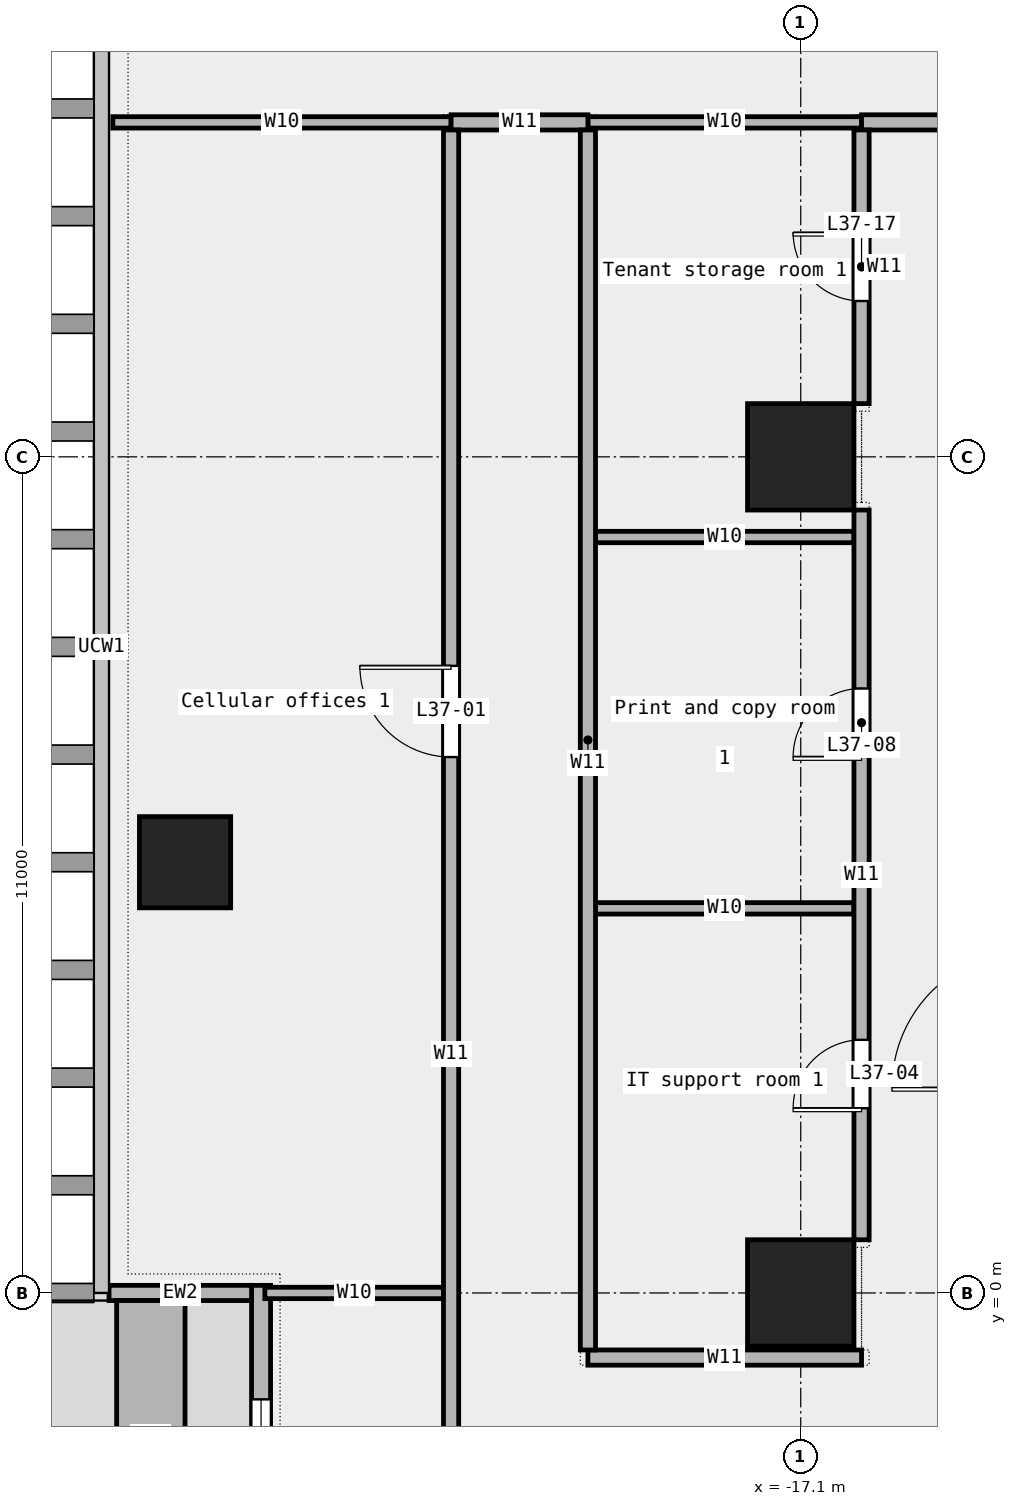
"""IFC4 building model, lengths in metres.
Left out: names, types, materials, properties, quantities, classifications, styles, units other than length and angle.
Written with IfcOpenShell. Run it as: python <this file> out.ifc"""

import sys

from ifc_helpers import new_model, si_unit, direction, frame, frame_2d, origin, origin_2d, place, context, subcontext, project, spatial, rectangle, extrude, element, fill, save


model = new_model("IFC4")
c1 = context("Model", 3, precision=1e-05, world=origin(), true_north=direction((0.0, 1.0)))
c2 = subcontext(c1, "Body", "Model", "MODEL_VIEW")
j1 = project(units=[si_unit("LENGTHUNIT", "METRE"), si_unit("PLANEANGLEUNIT", "RADIAN")], contexts=[c1])
p1 = place(None, origin())
s1 = spatial("IfcSite", under=j1, at=p1, CompositionType="ELEMENT")
p2 = place(p1, origin())
s2 = spatial("IfcBuilding", under=s1, at=p2, CompositionType="ELEMENT")
p3 = place(p2, frame((0.0, 0.0, 181.0)))
s3 = spatial("IfcBuildingStorey", under=s2, at=p3, CompositionType="ELEMENT", Elevation=181.0)
p4 = place(p3, frame((-25.2, 5.667, 0.0), z_axis=(0.0, 0.0, 1.0), x_axis=(1.0, 0.0, 0.0)))
e1 = element("IfcColumn", 1, at=p4, inside=s3, PredefinedType="COLUMN", context=c2, shape_type="SweptSolid", body=[
    extrude(rectangle(XDim=1.2, YDim=1.2, at=origin_2d()), origin(), (0.0, 0.0, 1.0), 3.6),
])
for number, where, z_axis, x_axis in (
    (2, (-17.1, 0.0, 0.0), (0.0, 0.0, 1.0), (1.0, 0.0, 0.0)),
    (3, (-17.1, 11.0, 0.0), (0.0, 0.0, 1.0), (1.0, 0.0, 0.0)),
):
    element("IfcColumn", number, at=place(p3, frame(where, z_axis=z_axis, x_axis=x_axis)), inside=s3, PredefinedType="COLUMN", context=c2, shape_type="SweptSolid", body=[
        extrude(rectangle(XDim=1.4, YDim=1.4, at=origin_2d()), origin(), (0.0, 0.0, 1.0), 3.6),
    ])
p5 = place(p3, frame((-24.2, 0.1, 0.0), z_axis=(0.0, 0.0, 1.0), x_axis=(0.0, -1.0, 0.0)))
e4 = element("IfcWall", 4, at=p5, inside=s3, PredefinedType="STANDARD", context=c2, shape_type="SweptSolid", body=[
    extrude(rectangle(XDim=12.95, YDim=0.25, at=frame_2d((6.475, 0.0))), origin(), (0.0, 0.0, 1.0), 3.6),
])
p6 = place(p5, frame((1.5, 0.0, 0.45)))
e5 = element("IfcOpeningElement", 5, at=p6, cuts=e4, PredefinedType="OPENING", context=c2, shape_type="SweptSolid", body=[
    extrude(rectangle(XDim=1.5, YDim=2.4, at=frame_2d((0.75, 1.2))), frame((0.0, 0.137, 0.0), z_axis=(0.0, -1.0, 0.0), x_axis=(1.0, 0.0, 0.0)), (0.0, 0.0, 1.0), 0.274),
])
p7 = place(p5, frame((6.75, 0.0, 0.0)))
e6 = element("IfcOpeningElement", 6, at=p7, cuts=e4, PredefinedType="OPENING", context=c2, shape_type="SweptSolid", body=[
    extrude(rectangle(XDim=1.8, YDim=2.4, at=frame_2d((0.9, 1.2))), frame((0.0, 0.137, 0.0), z_axis=(0.0, -1.0, 0.0), x_axis=(1.0, 0.0, 0.0)), (0.0, 0.0, 1.0), 0.274),
])
p8 = place(p5, frame((10.0, 0.0, 0.45)))
e7 = element("IfcOpeningElement", 7, at=p8, cuts=e4, PredefinedType="OPENING", context=c2, shape_type="SweptSolid", body=[
    extrude(rectangle(XDim=1.5, YDim=2.4, at=frame_2d((0.75, 1.2))), frame((0.0, 0.137, 0.0), z_axis=(0.0, -1.0, 0.0), x_axis=(1.0, 0.0, 0.0)), (0.0, 0.0, 1.0), 0.274),
])
p9 = place(p3, frame((-26.2, 0.0, 0.0), z_axis=(0.0, 0.0, 1.0), x_axis=(1.0, 0.0, 0.0)))
e8 = element("IfcWall", 8, at=p9, inside=s3, PredefinedType="STANDARD", context=c2, shape_type="SweptSolid", body=[
    extrude(rectangle(XDim=1.875, YDim=0.2, at=frame_2d((0.938, 0.0))), origin(), (0.0, 0.0, 1.0), 3.6),
])
p10 = place(p3, frame((-25.65, -0.1, 0.0), z_axis=(0.0, 0.0, 1.0), x_axis=(0.0, -1.0, 0.0)))
e9 = element("IfcWall", 9, at=p10, inside=s3, PredefinedType="STANDARD", context=c2, shape_type="SweptSolid", body=[
    extrude(rectangle(XDim=3.6, YDim=0.9, at=frame_2d((1.8, 0.0))), origin(), (0.0, 0.0, 1.0), 0.7),
])
p11 = place(p3, frame((-19.9, -0.85, 0.0), z_axis=(0.0, 0.0, 1.0), x_axis=(1.0, 0.0, 0.0)))
e10 = element("IfcWall", 10, at=p11, inside=s3, PredefinedType="PARTITIONING", context=c2, shape_type="SweptSolid", body=[
    extrude(rectangle(XDim=3.6, YDim=0.2, at=frame_2d((1.8, 0.0))), origin(), (0.0, 0.0, 1.0), 3.6),
])
p12 = place(p3, frame((-24.15, 0.0, 0.0), z_axis=(0.0, 0.0, 1.0), x_axis=(1.0, 0.0, 0.0)))
e11 = element("IfcWall", 11, at=p12, inside=s3, PredefinedType="PARTITIONING", context=c2, shape_type="SweptSolid", body=[
    extrude(rectangle(XDim=2.35, YDim=0.15, at=frame_2d((1.175, 0.0))), origin(), (0.0, 0.0, 1.0), 3.6),
])
for number, where, z_axis, x_axis in (
    (12, (-19.8, 5.06, 0.0), (0.0, 0.0, 1.0), (1.0, 0.0, 0.0)),
    (13, (-19.8, 9.945, 0.0), (0.0, 0.0, 1.0), (1.0, 0.0, 0.0)),
):
    element("IfcWall", number, at=place(p3, frame(where, z_axis=z_axis, x_axis=x_axis)), inside=s3, PredefinedType="PARTITIONING", context=c2, shape_type="SweptSolid", body=[
        extrude(rectangle(XDim=3.4, YDim=0.15, at=frame_2d((1.7, 0.0))), origin(), (0.0, 0.0, 1.0), 3.6),
    ])
p13 = place(p3, frame((-26.15, 15.4, 0.0), z_axis=(0.0, 0.0, 1.0), x_axis=(1.0, 0.0, 0.0)))
e14 = element("IfcWall", 14, at=p13, inside=s3, PredefinedType="PARTITIONING", context=c2, shape_type="SweptSolid", body=[
    extrude(rectangle(XDim=4.45, YDim=0.15, at=frame_2d((2.225, 0.0))), origin(), (0.0, 0.0, 1.0), 3.6),
])
p14 = place(p3, frame((-19.9, 15.4, 0.0), z_axis=(0.0, 0.0, 1.0), x_axis=(1.0, 0.0, 0.0)))
e15 = element("IfcWall", 15, at=p14, inside=s3, PredefinedType="PARTITIONING", context=c2, shape_type="SweptSolid", body=[
    extrude(rectangle(XDim=3.6, YDim=0.15, at=frame_2d((1.8, 0.0))), origin(), (0.0, 0.0, 1.0), 3.6),
])
p15 = place(p3, frame((-21.7, 15.4, 0.0), z_axis=(0.0, 0.0, 1.0), x_axis=(1.0, 0.0, 0.0)))
e16 = element("IfcWall", 16, at=p15, inside=s3, PredefinedType="PARTITIONING", context=c2, shape_type="SweptSolid", body=[
    extrude(rectangle(XDim=1.8, YDim=0.2, at=frame_2d((0.9, 0.0))), origin(), (0.0, 0.0, 1.0), 3.6),
])
p16 = place(p3, frame((-16.3, 15.4, 0.0), z_axis=(0.0, 0.0, 1.0), x_axis=(1.0, 0.0, 0.0)))
e17 = element("IfcWall", 17, at=p16, inside=s3, PredefinedType="PARTITIONING", context=c2, shape_type="SweptSolid", body=[
    extrude(rectangle(XDim=32.6, YDim=0.2, at=frame_2d((16.3, 0.0))), origin(), (0.0, 0.0, 1.0), 3.6),
])
p17 = place(p16, frame((24.677, 0.0, 0.0)))
e18 = element("IfcOpeningElement", 18, at=p17, cuts=e17, PredefinedType="OPENING", context=c2, shape_type="SweptSolid", body=[
    extrude(rectangle(XDim=1.2, YDim=2.1, at=frame_2d((0.6, 1.05))), frame((0.0, 0.112, 0.0), z_axis=(0.0, -1.0, 0.0), x_axis=(1.0, 0.0, 0.0)), (0.0, 0.0, 1.0), 0.224),
])
p18 = place(p16, frame((4.805, 0.0, 0.0)))
e19 = element("IfcOpeningElement", 19, at=p18, cuts=e17, PredefinedType="OPENING", context=c2, shape_type="SweptSolid", body=[
    extrude(rectangle(XDim=1.5, YDim=2.1, at=frame_2d((0.75, 1.05))), frame((0.0, 0.112, 0.0), z_axis=(0.0, -1.0, 0.0), x_axis=(1.0, 0.0, 0.0)), (0.0, 0.0, 1.0), 0.224),
])
p19 = place(p16, frame((14.228, 0.0, 0.0)))
e20 = element("IfcOpeningElement", 20, at=p19, cuts=e17, PredefinedType="OPENING", context=c2, shape_type="SweptSolid", body=[
    extrude(rectangle(XDim=1.2, YDim=2.1, at=frame_2d((0.6, 1.05))), frame((0.0, 0.112, 0.0), z_axis=(0.0, -1.0, 0.0), x_axis=(1.0, 0.0, 0.0)), (0.0, 0.0, 1.0), 0.224),
])
p20 = place(p3, frame((-21.7, -9.0, 0.0), z_axis=(0.0, 0.0, 1.0), x_axis=(0.0, 1.0, 0.0)))
e21 = element("IfcWall", 21, at=p20, inside=s3, PredefinedType="PARTITIONING", context=c2, shape_type="SweptSolid", body=[
    extrude(rectangle(XDim=24.3, YDim=0.2, at=frame_2d((12.15, 0.0))), origin(), (0.0, 0.0, 1.0), 3.6),
])
p21 = place(p20, frame((16.05, 0.0, 0.0)))
e22 = element("IfcOpeningElement", 22, at=p21, cuts=e21, PredefinedType="OPENING", context=c2, shape_type="SweptSolid", body=[
    extrude(rectangle(XDim=1.2, YDim=2.1, at=frame_2d((0.6, 1.05))), frame((0.0, 0.112, 0.0), z_axis=(0.0, -1.0, 0.0), x_axis=(1.0, 0.0, 0.0)), (0.0, 0.0, 1.0), 0.224),
])
p22 = place(p3, frame((-19.9, -0.75, 0.0), z_axis=(0.0, 0.0, 1.0), x_axis=(0.0, 1.0, 0.0)))
e23 = element("IfcWall", 23, at=p22, inside=s3, PredefinedType="PARTITIONING", context=c2, shape_type="SweptSolid", body=[
    extrude(rectangle(XDim=16.05, YDim=0.2, at=frame_2d((8.025, 0.0))), origin(), (0.0, 0.0, 1.0), 3.6),
])
p23 = place(p3, frame((-16.3, 0.7, 0.0), z_axis=(0.0, 0.0, 1.0), x_axis=(0.0, 1.0, 0.0)))
e24 = element("IfcWall", 24, at=p23, inside=s3, PredefinedType="PARTITIONING", context=c2, shape_type="SweptSolid", body=[
    extrude(rectangle(XDim=9.6, YDim=0.2, at=frame_2d((4.8, 0.0))), origin(), (0.0, 0.0, 1.0), 3.6),
])
p24 = place(p23, frame((1.73, 0.0, 0.0)))
e25 = element("IfcOpeningElement", 25, at=p24, cuts=e24, PredefinedType="OPENING", context=c2, shape_type="SweptSolid", body=[
    extrude(rectangle(XDim=0.9, YDim=2.1, at=frame_2d((0.45, 1.05))), frame((0.0, 0.112, 0.0), z_axis=(0.0, -1.0, 0.0), x_axis=(1.0, 0.0, 0.0)), (0.0, 0.0, 1.0), 0.224),
])
p25 = place(p23, frame((6.353, 0.0, 0.0)))
e26 = element("IfcOpeningElement", 26, at=p25, cuts=e24, PredefinedType="OPENING", context=c2, shape_type="SweptSolid", body=[
    extrude(rectangle(XDim=0.9, YDim=2.1, at=frame_2d((0.45, 1.05))), frame((0.0, 0.112, 0.0), z_axis=(0.0, -1.0, 0.0), x_axis=(1.0, 0.0, 0.0)), (0.0, 0.0, 1.0), 0.224),
])
p26 = place(p3, frame((-16.3, 11.7, 0.0), z_axis=(0.0, 0.0, 1.0), x_axis=(0.0, 1.0, 0.0)))
e27 = element("IfcWall", 27, at=p26, inside=s3, PredefinedType="PARTITIONING", context=c2, shape_type="SweptSolid", body=[
    extrude(rectangle(XDim=3.6, YDim=0.2, at=frame_2d((1.8, 0.0))), origin(), (0.0, 0.0, 1.0), 3.6),
])
p27 = place(p26, frame((1.35, 0.0, 0.0)))
e28 = element("IfcOpeningElement", 28, at=p27, cuts=e27, PredefinedType="OPENING", context=c2, shape_type="SweptSolid", body=[
    extrude(rectangle(XDim=0.9, YDim=2.1, at=frame_2d((0.45, 1.05))), frame((0.0, 0.112, 0.0), z_axis=(0.0, -1.0, 0.0), x_axis=(1.0, 0.0, 0.0)), (0.0, 0.0, 1.0), 0.224),
])
p28 = place(p6, origin())
e29 = element("IfcWindow", 29, at=p28, inside=s3, PartitioningType="SINGLE_PANEL", PredefinedType="WINDOW", context=c2, shape_type="SweptSolid", body=[
    extrude(rectangle(XDim=1.5, YDim=2.4, at=frame_2d((0.75, 1.2))), frame((0.0, 0.03, 0.0), z_axis=(0.0, -1.0, 0.0), x_axis=(1.0, 0.0, 0.0)), (0.0, 0.0, 1.0), 0.06),
])
fill(e5, e29)
p29 = place(p21, origin())
e30 = element("IfcDoor", 30, at=p29, inside=s3, OperationType="SINGLE_SWING_RIGHT", PredefinedType="DOOR", context=c2, shape_type="SweptSolid", body=[
    extrude(rectangle(XDim=1.2, YDim=2.1, at=frame_2d((0.6, 1.05))), frame((0.0, 0.025, 0.0), z_axis=(0.0, -1.0, 0.0), x_axis=(1.0, 0.0, 0.0)), (0.0, 0.0, 1.0), 0.05),
])
fill(e22, e30)
p30 = place(p24, origin())
e31 = element("IfcDoor", 31, at=p30, inside=s3, OperationType="SINGLE_SWING_LEFT", PredefinedType="DOOR", context=c2, shape_type="SweptSolid", body=[
    extrude(rectangle(XDim=0.9, YDim=2.1, at=frame_2d((0.45, 1.05))), frame((0.0, 0.025, 0.0), z_axis=(0.0, -1.0, 0.0), x_axis=(1.0, 0.0, 0.0)), (0.0, 0.0, 1.0), 0.05),
])
fill(e25, e31)
p31 = place(p25, origin())
e32 = element("IfcDoor", 32, at=p31, inside=s3, OperationType="SINGLE_SWING_LEFT", PredefinedType="DOOR", context=c2, shape_type="SweptSolid", body=[
    extrude(rectangle(XDim=0.9, YDim=2.1, at=frame_2d((0.45, 1.05))), frame((0.0, 0.025, 0.0), z_axis=(0.0, -1.0, 0.0), x_axis=(1.0, 0.0, 0.0)), (0.0, 0.0, 1.0), 0.05),
])
fill(e26, e32)
p32 = place(p27, origin())
e33 = element("IfcDoor", 33, at=p32, inside=s3, OperationType="SINGLE_SWING_RIGHT", PredefinedType="DOOR", context=c2, shape_type="SweptSolid", body=[
    extrude(rectangle(XDim=0.9, YDim=2.1, at=frame_2d((0.45, 1.05))), frame((0.0, 0.025, 0.0), z_axis=(0.0, -1.0, 0.0), x_axis=(1.0, 0.0, 0.0)), (0.0, 0.0, 1.0), 0.05),
])
fill(e28, e33)
save(model, sys.argv[1])
